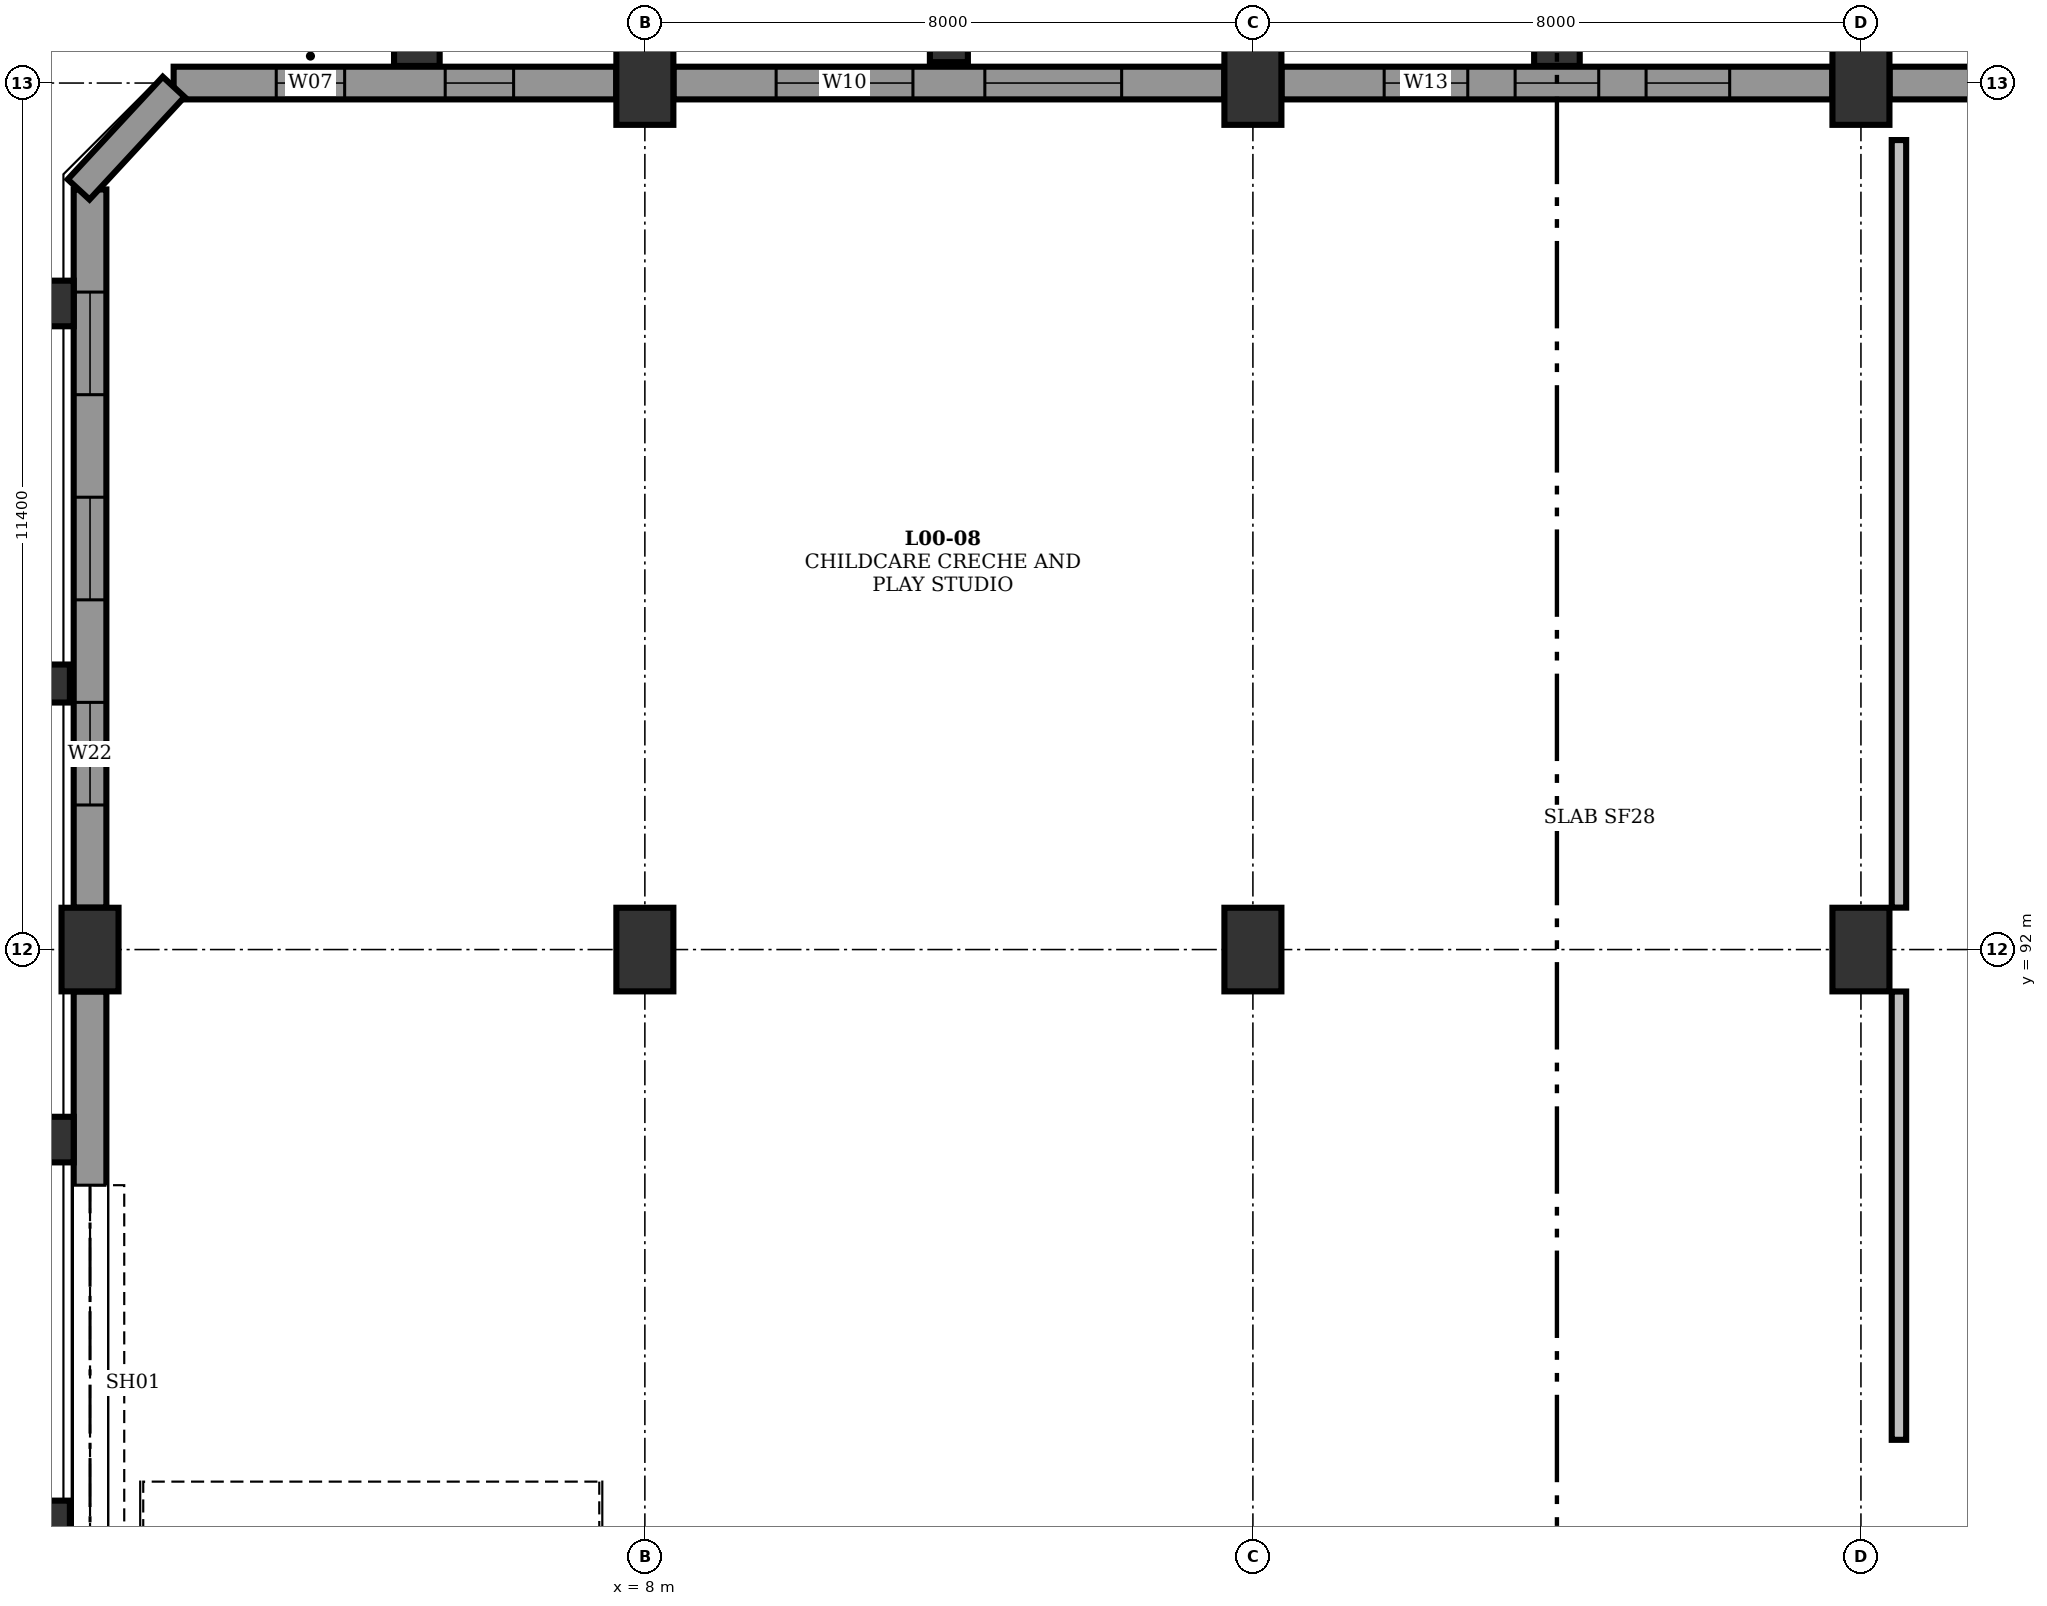
"""IFC4 building model, lengths in metres.
Left out: names, types, materials, properties, quantities, classifications, styles, units other than length and angle.
Written with IfcOpenShell. Run it as: python <this file> out.ifc"""

import sys

from ifc_helpers import new_model, si_unit, direction, frame, frame_2d, origin, origin_2d, place, context, subcontext, project, spatial, rectangle, extrude, element, fill, save


model = new_model("IFC4")
c1 = context("Model", 3, precision=1e-05, world=origin(), true_north=direction((0.0, 1.0)))
c2 = subcontext(c1, "Body", "Model", "MODEL_VIEW")
j1 = project(units=[si_unit("LENGTHUNIT", "METRE"), si_unit("PLANEANGLEUNIT", "RADIAN")], contexts=[c1])
p1 = place(None, origin())
s1 = spatial("IfcSite", under=j1, at=p1, CompositionType="ELEMENT")
p2 = place(p1, origin())
s2 = spatial("IfcBuilding", under=s1, at=p2, CompositionType="ELEMENT")
p3 = place(p2, origin())
s3 = spatial("IfcBuildingStorey", under=s2, at=p3, CompositionType="ELEMENT", Elevation=0.0)
for number, where, z_axis, x_axis in (
    (1, (0.7, 92.0, 0.0), (0.0, 0.0, 1.0), (1.0, 0.0, 0.0)),
    (2, (8.0, 92.0, 0.0), (0.0, 0.0, 1.0), (1.0, 0.0, 0.0)),
    (3, (8.0, 103.4, 0.0), (0.0, 0.0, 1.0), (1.0, 0.0, 0.0)),
    (4, (16.0, 92.0, 0.0), (0.0, 0.0, 1.0), (1.0, 0.0, 0.0)),
    (5, (16.0, 103.4, 0.0), (0.0, 0.0, 1.0), (1.0, 0.0, 0.0)),
    (6, (24.0, 92.0, 0.0), (0.0, 0.0, 1.0), (1.0, 0.0, 0.0)),
    (7, (24.0, 103.4, 0.0), (0.0, 0.0, 1.0), (1.0, 0.0, 0.0)),
):
    element("IfcColumn", number, at=place(p3, frame(where, z_axis=z_axis, x_axis=x_axis)), inside=s3, PredefinedType="COLUMN", context=c2, shape_type="SweptSolid", body=[
        extrude(rectangle(XDim=0.75, YDim=1.1, at=origin_2d()), origin(), (0.0, 0.0, 1.0), 5.4),
    ])
p4 = place(p3, frame((0.26, 84.5, 0.0), z_axis=(0.0, 0.0, 1.0), x_axis=(1.0, 0.0, 0.0)))
e8 = element("IfcColumn", 8, at=p4, inside=s3, PredefinedType="PILASTER", context=c2, shape_type="SweptSolid", body=[
    extrude(rectangle(XDim=0.35, YDim=0.5, at=origin_2d()), origin(), (0.0, 0.0, 1.0), 5.4),
])
p5 = place(p3, frame((0.26, 89.5, 0.0), z_axis=(0.0, 0.0, 1.0), x_axis=(1.0, 0.0, 0.0)))
e9 = element("IfcColumn", 9, at=p5, inside=s3, PredefinedType="PILASTER", context=c2, shape_type="SweptSolid", body=[
    extrude(rectangle(XDim=0.45, YDim=0.6, at=origin_2d()), origin(), (0.0, 0.0, 1.0), 5.4),
])
p6 = place(p3, frame((0.26, 95.5, 0.0), z_axis=(0.0, 0.0, 1.0), x_axis=(1.0, 0.0, 0.0)))
e10 = element("IfcColumn", 10, at=p6, inside=s3, PredefinedType="PILASTER", context=c2, shape_type="SweptSolid", body=[
    extrude(rectangle(XDim=0.35, YDim=0.5, at=origin_2d()), origin(), (0.0, 0.0, 1.0), 6.15),
])
p7 = place(p3, frame((0.26, 100.5, 0.0), z_axis=(0.0, 0.0, 1.0), x_axis=(1.0, 0.0, 0.0)))
e11 = element("IfcColumn", 11, at=p7, inside=s3, PredefinedType="PILASTER", context=c2, shape_type="SweptSolid", body=[
    extrude(rectangle(XDim=0.45, YDim=0.6, at=origin_2d()), origin(), (0.0, 0.0, 1.0), 6.15),
])
p8 = place(p3, frame((5.0, 103.85, 0.0), z_axis=(0.0, 0.0, 1.0), x_axis=(0.0, 1.0, 0.0)))
e12 = element("IfcColumn", 12, at=p8, inside=s3, PredefinedType="PILASTER", context=c2, shape_type="SweptSolid", body=[
    extrude(rectangle(XDim=0.45, YDim=0.6, at=origin_2d()), origin(), (0.0, 0.0, 1.0), 6.2),
])
p9 = place(p3, frame((12.0, 103.85, 0.0), z_axis=(0.0, 0.0, 1.0), x_axis=(0.0, 1.0, 0.0)))
e13 = element("IfcColumn", 13, at=p9, inside=s3, PredefinedType="PILASTER", context=c2, shape_type="SweptSolid", body=[
    extrude(rectangle(XDim=0.35, YDim=0.5, at=origin_2d()), origin(), (0.0, 0.0, 1.0), 6.2),
])
p10 = place(p3, frame((20.0, 103.85, 0.0), z_axis=(0.0, 0.0, 1.0), x_axis=(0.0, 1.0, 0.0)))
e14 = element("IfcColumn", 14, at=p10, inside=s3, PredefinedType="PILASTER", context=c2, shape_type="SweptSolid", body=[
    extrude(rectangle(XDim=0.45, YDim=0.6, at=origin_2d()), origin(), (0.0, 0.0, 1.0), 6.2),
])
p11 = place(p3, frame((0.7, 81.152, 0.0), z_axis=(0.0, 0.0, 1.0), x_axis=(0.0, 1.0, 0.0)))
e15 = element("IfcWall", 15, at=p11, inside=s3, PredefinedType="STANDARD", context=c2, shape_type="SweptSolid", body=[
    extrude(rectangle(XDim=10.296, YDim=0.43, at=frame_2d((5.148, 0.0))), origin(), (0.0, 0.0, 1.0), 4.612),
])
p12 = place(p11, frame((2.548, 0.0, 0.0)))
e16 = element("IfcOpeningElement", 16, at=p12, cuts=e15, PredefinedType="OPENING", context=c2, shape_type="SweptSolid", body=[
    extrude(rectangle(XDim=5.2, YDim=3.6, at=frame_2d((2.6, 1.8))), frame((0.0, 0.227, 0.0), z_axis=(0.0, -1.0, 0.0), x_axis=(1.0, 0.0, 0.0)), (0.0, 0.0, 1.0), 0.454),
])
p13 = place(p3, frame((0.7, 92.552, 0.0), z_axis=(0.0, 0.0, 1.0), x_axis=(0.0, 1.0, 0.0)))
e17 = element("IfcWall", 17, at=p13, inside=s3, PredefinedType="STANDARD", context=c2, shape_type="SweptSolid", body=[
    extrude(rectangle(XDim=9.448, YDim=0.43, at=frame_2d((4.724, 0.0))), origin(), (0.0, 0.0, 1.0), 5.1),
])
p14 = place(p13, frame((1.35, 0.0, 0.75)))
e18 = element("IfcOpeningElement", 18, at=p14, cuts=e17, PredefinedType="OPENING", context=c2, shape_type="SweptSolid", body=[
    extrude(rectangle(XDim=1.35, YDim=1.55, at=frame_2d((0.675, 0.775))), frame((0.0, 0.227, 0.0), z_axis=(0.0, -1.0, 0.0), x_axis=(1.0, 0.0, 0.0)), (0.0, 0.0, 1.0), 0.454),
])
p15 = place(p13, frame((4.049, 0.0, 0.75)))
e19 = element("IfcOpeningElement", 19, at=p15, cuts=e17, PredefinedType="OPENING", context=c2, shape_type="SweptSolid", body=[
    extrude(rectangle(XDim=1.35, YDim=1.55, at=frame_2d((0.675, 0.775))), frame((0.0, 0.227, 0.0), z_axis=(0.0, -1.0, 0.0), x_axis=(1.0, 0.0, 0.0)), (0.0, 0.0, 1.0), 0.454),
])
p16 = place(p13, frame((6.748, 0.0, 0.75)))
e20 = element("IfcOpeningElement", 20, at=p16, cuts=e17, PredefinedType="OPENING", context=c2, shape_type="SweptSolid", body=[
    extrude(rectangle(XDim=1.35, YDim=1.55, at=frame_2d((0.675, 0.775))), frame((0.0, 0.227, 0.0), z_axis=(0.0, -1.0, 0.0), x_axis=(1.0, 0.0, 0.0)), (0.0, 0.0, 1.0), 0.454),
])
p17 = place(p3, frame((1.8, 103.4, 0.0), z_axis=(0.0, 0.0, 1.0), x_axis=(1.0, 0.0, 0.0)))
e21 = element("IfcWall", 21, at=p17, inside=s3, PredefinedType="STANDARD", context=c2, shape_type="SweptSolid", body=[
    extrude(rectangle(XDim=5.823, YDim=0.43, at=frame_2d((2.912, 0.0))), origin(), (0.0, 0.0, 1.0), 4.245),
])
p18 = place(p17, frame((1.35, 0.0, 0.75)))
e22 = element("IfcOpeningElement", 22, at=p18, cuts=e21, PredefinedType="OPENING", context=c2, shape_type="SweptSolid", body=[
    extrude(rectangle(XDim=0.9, YDim=2.05, at=frame_2d((0.45, 1.025))), frame((0.0, 0.227, 0.0), z_axis=(0.0, -1.0, 0.0), x_axis=(1.0, 0.0, 0.0)), (0.0, 0.0, 1.0), 0.454),
])
p19 = place(p17, frame((3.573, 0.0, 0.75)))
e23 = element("IfcOpeningElement", 23, at=p19, cuts=e21, PredefinedType="OPENING", context=c2, shape_type="SweptSolid", body=[
    extrude(rectangle(XDim=0.9, YDim=2.05, at=frame_2d((0.45, 1.025))), frame((0.0, 0.227, 0.0), z_axis=(0.0, -1.0, 0.0), x_axis=(1.0, 0.0, 0.0)), (0.0, 0.0, 1.0), 0.454),
])
p20 = place(p3, frame((8.377, 103.4, 0.0), z_axis=(0.0, 0.0, 1.0), x_axis=(1.0, 0.0, 0.0)))
e24 = element("IfcWall", 24, at=p20, inside=s3, PredefinedType="STANDARD", context=c2, shape_type="SweptSolid", body=[
    extrude(rectangle(XDim=7.246, YDim=0.43, at=frame_2d((3.623, 0.0))), origin(), (0.0, 0.0, 1.0), 4.245),
])
p21 = place(p20, frame((1.35, 0.0, 0.75)))
e25 = element("IfcOpeningElement", 25, at=p21, cuts=e24, PredefinedType="OPENING", context=c2, shape_type="SweptSolid", body=[
    extrude(rectangle(XDim=1.8, YDim=2.05, at=frame_2d((0.9, 1.025))), frame((0.0, 0.227, 0.0), z_axis=(0.0, -1.0, 0.0), x_axis=(1.0, 0.0, 0.0)), (0.0, 0.0, 1.0), 0.454),
])
p22 = place(p20, frame((4.096, 0.0, 0.75)))
e26 = element("IfcOpeningElement", 26, at=p22, cuts=e24, PredefinedType="OPENING", context=c2, shape_type="SweptSolid", body=[
    extrude(rectangle(XDim=1.8, YDim=2.05, at=frame_2d((0.9, 1.025))), frame((0.0, 0.227, 0.0), z_axis=(0.0, -1.0, 0.0), x_axis=(1.0, 0.0, 0.0)), (0.0, 0.0, 1.0), 0.454),
])
p23 = place(p3, frame((16.377, 103.4, 0.0), z_axis=(0.0, 0.0, 1.0), x_axis=(1.0, 0.0, 0.0)))
e27 = element("IfcWall", 27, at=p23, inside=s3, PredefinedType="STANDARD", context=c2, shape_type="SweptSolid", body=[
    extrude(rectangle(XDim=7.246, YDim=0.43, at=frame_2d((3.623, 0.0))), origin(), (0.0, 0.0, 1.0), 4.245),
])
p24 = place(p23, frame((1.35, 0.0, 0.75)))
e28 = element("IfcOpeningElement", 28, at=p24, cuts=e27, PredefinedType="OPENING", context=c2, shape_type="SweptSolid", body=[
    extrude(rectangle(XDim=1.1, YDim=1.25, at=frame_2d((0.55, 0.625))), frame((0.0, 0.227, 0.0), z_axis=(0.0, -1.0, 0.0), x_axis=(1.0, 0.0, 0.0)), (0.0, 0.0, 1.0), 0.454),
])
p25 = place(p23, frame((3.073, 0.0, 0.75)))
e29 = element("IfcOpeningElement", 29, at=p25, cuts=e27, PredefinedType="OPENING", context=c2, shape_type="SweptSolid", body=[
    extrude(rectangle(XDim=1.1, YDim=1.25, at=frame_2d((0.55, 0.625))), frame((0.0, 0.227, 0.0), z_axis=(0.0, -1.0, 0.0), x_axis=(1.0, 0.0, 0.0)), (0.0, 0.0, 1.0), 0.454),
])
p26 = place(p23, frame((4.796, 0.0, 0.75)))
e30 = element("IfcOpeningElement", 30, at=p26, cuts=e27, PredefinedType="OPENING", context=c2, shape_type="SweptSolid", body=[
    extrude(rectangle(XDim=1.1, YDim=1.25, at=frame_2d((0.55, 0.625))), frame((0.0, 0.227, 0.0), z_axis=(0.0, -1.0, 0.0), x_axis=(1.0, 0.0, 0.0)), (0.0, 0.0, 1.0), 0.454),
])
p27 = place(p3, frame((24.377, 103.4, 0.0), z_axis=(0.0, 0.0, 1.0), x_axis=(1.0, 0.0, 0.0)))
e31 = element("IfcWall", 31, at=p27, inside=s3, PredefinedType="STANDARD", context=c2, shape_type="SweptSolid", body=[
    extrude(rectangle(XDim=7.496, YDim=0.43, at=frame_2d((3.748, 0.0))), origin(), (0.0, 0.0, 1.0), 4.245),
])
p28 = place(p27, frame((1.35, 0.0, 0.75)))
e32 = element("IfcOpeningElement", 32, at=p28, cuts=e31, PredefinedType="OPENING", context=c2, shape_type="SweptSolid", body=[
    extrude(rectangle(XDim=1.05, YDim=2.35, at=frame_2d((0.525, 1.175))), frame((0.0, 0.227, 0.0), z_axis=(0.0, -1.0, 0.0), x_axis=(1.0, 0.0, 0.0)), (0.0, 0.0, 1.0), 0.454),
])
p29 = place(p27, frame((3.223, 0.0, 0.75)))
e33 = element("IfcOpeningElement", 33, at=p29, cuts=e31, PredefinedType="OPENING", context=c2, shape_type="SweptSolid", body=[
    extrude(rectangle(XDim=1.05, YDim=2.35, at=frame_2d((0.525, 1.175))), frame((0.0, 0.227, 0.0), z_axis=(0.0, -1.0, 0.0), x_axis=(1.0, 0.0, 0.0)), (0.0, 0.0, 1.0), 0.454),
])
p30 = place(p27, frame((5.096, 0.0, 0.75)))
e34 = element("IfcOpeningElement", 34, at=p30, cuts=e31, PredefinedType="OPENING", context=c2, shape_type="SweptSolid", body=[
    extrude(rectangle(XDim=1.05, YDim=2.35, at=frame_2d((0.525, 1.175))), frame((0.0, 0.227, 0.0), z_axis=(0.0, -1.0, 0.0), x_axis=(1.0, 0.0, 0.0)), (0.0, 0.0, 1.0), 0.454),
])
p31 = place(p3, frame((0.55, 102.0, 0.0), z_axis=(0.0, 0.0, 1.0), x_axis=(0.679381571114, 0.733785173488, 0.0)))
e35 = element("IfcWall", 35, at=p31, inside=s3, PredefinedType="STANDARD", context=c2, shape_type="SweptSolid", body=[
    extrude(rectangle(XDim=1.84, YDim=0.39, at=frame_2d((0.92, 0.0))), origin(), (0.0, 0.0, 1.0), 5.1),
])
p32 = place(p3, frame((24.5, 85.55, 0.0), z_axis=(0.0, 0.0, 1.0), x_axis=(0.0, 1.0, 0.0)))
e36 = element("IfcWall", 36, at=p32, inside=s3, PredefinedType="SOLIDWALL", context=c2, shape_type="SweptSolid", body=[
    extrude(rectangle(XDim=5.898, YDim=0.19, at=frame_2d((2.949, 0.0))), origin(), (0.0, 0.0, 1.0), 5.16),
])
p33 = place(p3, frame((24.5, 92.552, 0.0), z_axis=(0.0, 0.0, 1.0), x_axis=(0.0, 1.0, 0.0)))
e37 = element("IfcWall", 37, at=p33, inside=s3, PredefinedType="SOLIDWALL", context=c2, shape_type="SweptSolid", body=[
    extrude(rectangle(XDim=10.098, YDim=0.19, at=frame_2d((5.049, 0.0))), origin(), (0.0, 0.0, 1.0), 5.16),
])
p34 = place(p12, origin())
e38 = element("IfcDoor", 38, at=p34, inside=s3, OperationType="ROLLINGUP", PredefinedType="DOOR", context=c2, shape_type="SweptSolid", body=[
    extrude(rectangle(XDim=5.2, YDim=3.6, at=frame_2d((2.6, 1.8))), frame((0.0, 0.025, 0.0), z_axis=(0.0, -1.0, 0.0), x_axis=(1.0, 0.0, 0.0)), (0.0, 0.0, 1.0), 0.05),
])
fill(e16, e38)
p35 = place(p14, origin())
e39 = element("IfcWindow", 39, at=p35, inside=s3, PartitioningType="DOUBLE_PANEL_VERTICAL", PredefinedType="WINDOW", context=c2, shape_type="SweptSolid", body=[
    extrude(rectangle(XDim=1.35, YDim=1.55, at=frame_2d((0.675, 0.775))), frame((0.0, 0.08, 0.0), z_axis=(0.0, -1.0, 0.0), x_axis=(1.0, 0.0, 0.0)), (0.0, 0.0, 1.0), 0.06),
])
fill(e18, e39)
p36 = place(p15, origin())
e40 = element("IfcWindow", 40, at=p36, inside=s3, PartitioningType="DOUBLE_PANEL_VERTICAL", PredefinedType="WINDOW", context=c2, shape_type="SweptSolid", body=[
    extrude(rectangle(XDim=1.35, YDim=1.55, at=frame_2d((0.675, 0.775))), frame((0.0, 0.08, 0.0), z_axis=(0.0, -1.0, 0.0), x_axis=(1.0, 0.0, 0.0)), (0.0, 0.0, 1.0), 0.06),
])
fill(e19, e40)
p37 = place(p16, origin())
e41 = element("IfcWindow", 41, at=p37, inside=s3, PartitioningType="DOUBLE_PANEL_VERTICAL", PredefinedType="WINDOW", context=c2, shape_type="SweptSolid", body=[
    extrude(rectangle(XDim=1.35, YDim=1.55, at=frame_2d((0.675, 0.775))), frame((0.0, 0.08, 0.0), z_axis=(0.0, -1.0, 0.0), x_axis=(1.0, 0.0, 0.0)), (0.0, 0.0, 1.0), 0.06),
])
fill(e20, e41)
p38 = place(p18, origin())
e42 = element("IfcWindow", 42, at=p38, inside=s3, PartitioningType="SINGLE_PANEL", PredefinedType="WINDOW", context=c2, shape_type="SweptSolid", body=[
    extrude(rectangle(XDim=0.9, YDim=2.05, at=frame_2d((0.45, 1.025))), frame((0.0, 0.08, 0.0), z_axis=(0.0, -1.0, 0.0), x_axis=(1.0, 0.0, 0.0)), (0.0, 0.0, 1.0), 0.06),
])
fill(e22, e42)
p39 = place(p19, origin())
e43 = element("IfcWindow", 43, at=p39, inside=s3, PartitioningType="SINGLE_PANEL", PredefinedType="WINDOW", context=c2, shape_type="SweptSolid", body=[
    extrude(rectangle(XDim=0.9, YDim=2.05, at=frame_2d((0.45, 1.025))), frame((0.0, 0.08, 0.0), z_axis=(0.0, -1.0, 0.0), x_axis=(1.0, 0.0, 0.0)), (0.0, 0.0, 1.0), 0.06),
])
fill(e23, e43)
p40 = place(p21, origin())
e44 = element("IfcWindow", 44, at=p40, inside=s3, PartitioningType="DOUBLE_PANEL_VERTICAL", PredefinedType="WINDOW", context=c2, shape_type="SweptSolid", body=[
    extrude(rectangle(XDim=1.8, YDim=2.05, at=frame_2d((0.9, 1.025))), frame((0.0, 0.08, 0.0), z_axis=(0.0, -1.0, 0.0), x_axis=(1.0, 0.0, 0.0)), (0.0, 0.0, 1.0), 0.06),
])
fill(e25, e44)
p41 = place(p22, origin())
e45 = element("IfcWindow", 45, at=p41, inside=s3, PartitioningType="DOUBLE_PANEL_VERTICAL", PredefinedType="WINDOW", context=c2, shape_type="SweptSolid", body=[
    extrude(rectangle(XDim=1.8, YDim=2.05, at=frame_2d((0.9, 1.025))), frame((0.0, 0.08, 0.0), z_axis=(0.0, -1.0, 0.0), x_axis=(1.0, 0.0, 0.0)), (0.0, 0.0, 1.0), 0.06),
])
fill(e26, e45)
p42 = place(p24, origin())
e46 = element("IfcWindow", 46, at=p42, inside=s3, PartitioningType="SINGLE_PANEL", PredefinedType="WINDOW", context=c2, shape_type="SweptSolid", body=[
    extrude(rectangle(XDim=1.1, YDim=1.25, at=frame_2d((0.55, 0.625))), frame((0.0, 0.08, 0.0), z_axis=(0.0, -1.0, 0.0), x_axis=(1.0, 0.0, 0.0)), (0.0, 0.0, 1.0), 0.06),
])
fill(e28, e46)
p43 = place(p25, origin())
e47 = element("IfcWindow", 47, at=p43, inside=s3, PartitioningType="SINGLE_PANEL", PredefinedType="WINDOW", context=c2, shape_type="SweptSolid", body=[
    extrude(rectangle(XDim=1.1, YDim=1.25, at=frame_2d((0.55, 0.625))), frame((0.0, 0.08, 0.0), z_axis=(0.0, -1.0, 0.0), x_axis=(1.0, 0.0, 0.0)), (0.0, 0.0, 1.0), 0.06),
])
fill(e29, e47)
p44 = place(p26, origin())
e48 = element("IfcWindow", 48, at=p44, inside=s3, PartitioningType="SINGLE_PANEL", PredefinedType="WINDOW", context=c2, shape_type="SweptSolid", body=[
    extrude(rectangle(XDim=1.1, YDim=1.25, at=frame_2d((0.55, 0.625))), frame((0.0, 0.08, 0.0), z_axis=(0.0, -1.0, 0.0), x_axis=(1.0, 0.0, 0.0)), (0.0, 0.0, 1.0), 0.06),
])
fill(e30, e48)
save(model, sys.argv[1])
